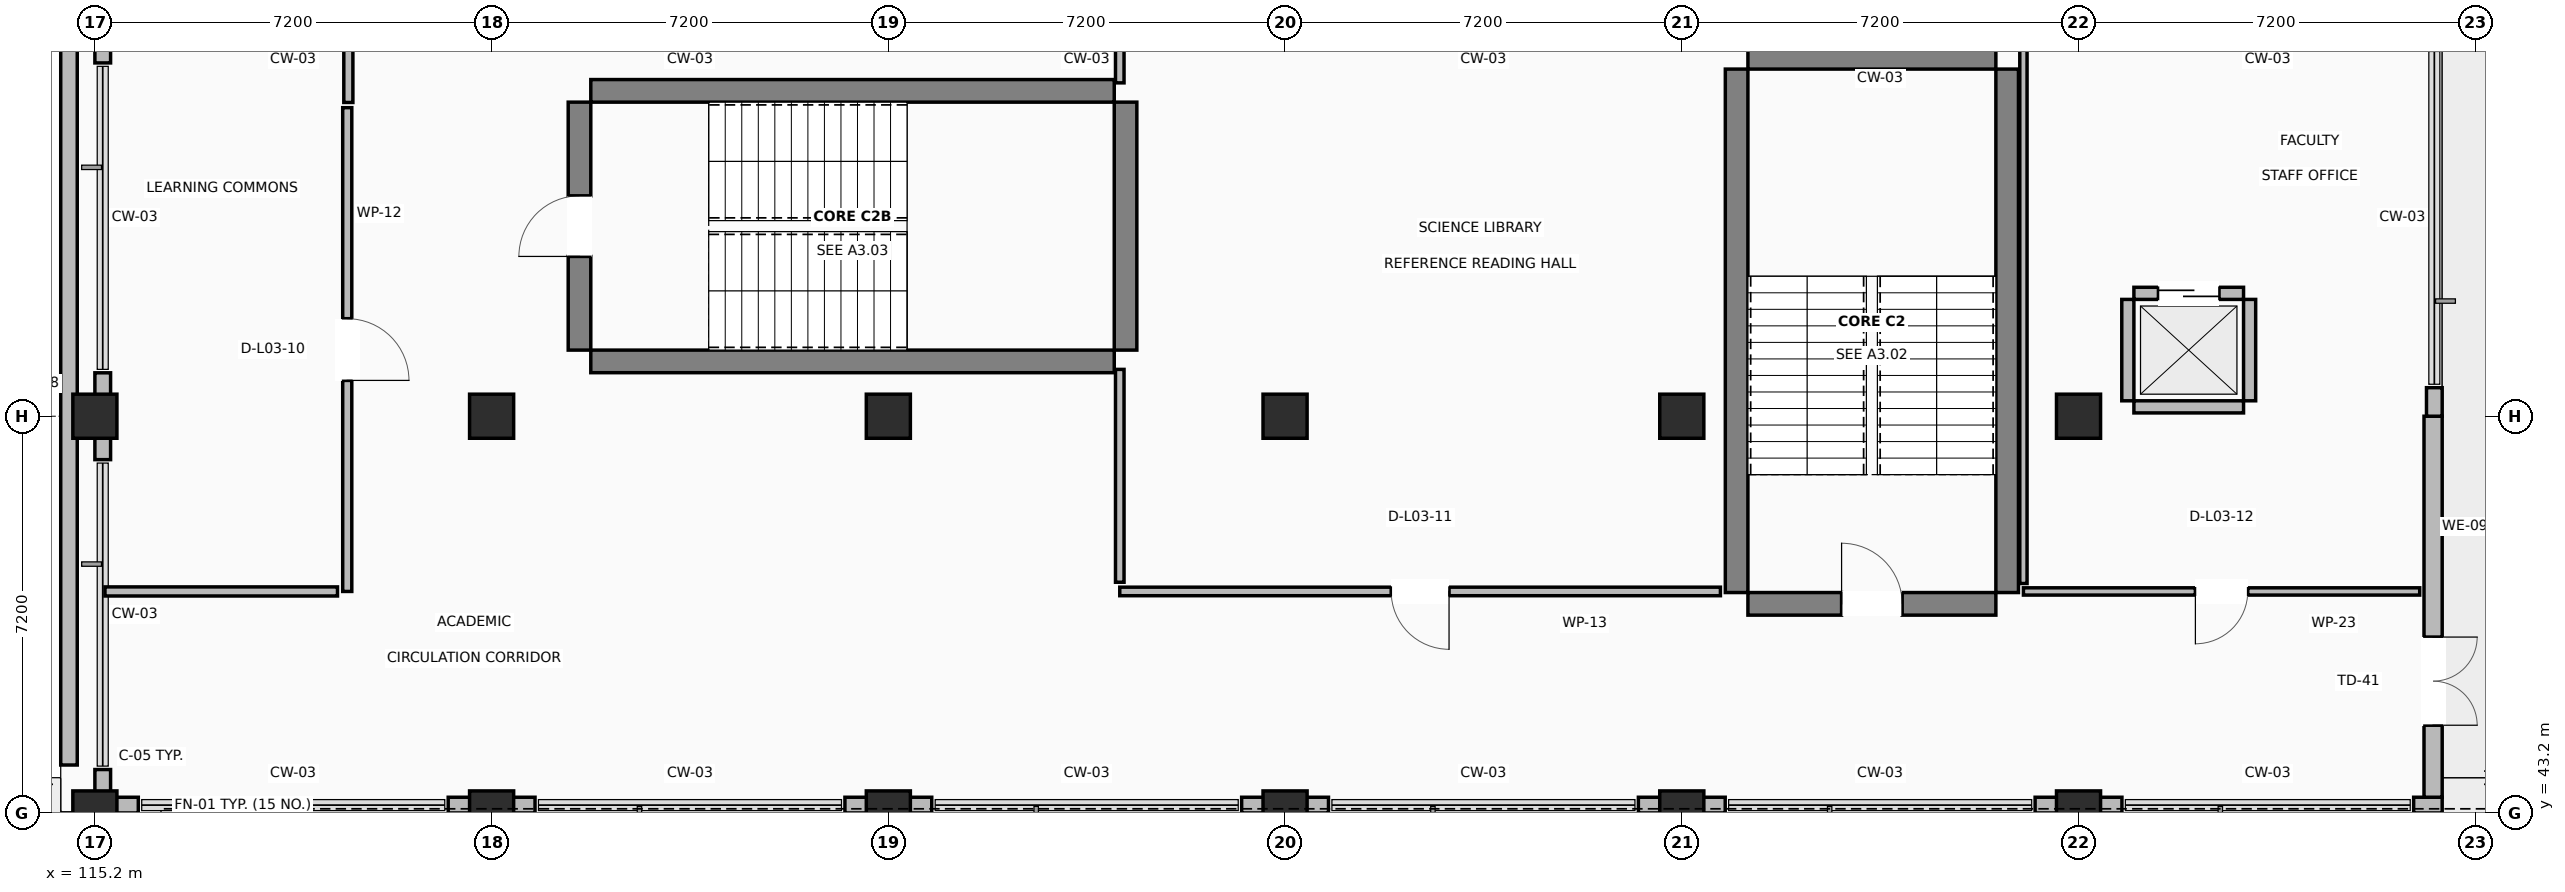
"""IFC4 building model, lengths in metres.
Left out: names, types, materials, properties, quantities, classifications, styles, units other than length and angle.
Written with IfcOpenShell. Run it as: python <this file> out.ifc"""

import sys

from ifc_helpers import new_model, si_unit, direction, frame, frame_2d, origin, origin_2d, place, context, subcontext, project, spatial, rectangle, extrude, element, fill, save


model = new_model("IFC4")
c1 = context("Model", 3, precision=1e-05, world=origin(), true_north=direction((0.0, 1.0)))
c2 = subcontext(c1, "Body", "Model", "MODEL_VIEW")
j1 = project(units=[si_unit("LENGTHUNIT", "METRE"), si_unit("PLANEANGLEUNIT", "RADIAN")], contexts=[c1])
p1 = place(None, origin())
s1 = spatial("IfcSite", under=j1, at=p1, CompositionType="ELEMENT")
p2 = place(p1, origin())
s2 = spatial("IfcBuilding", under=s1, at=p2, CompositionType="ELEMENT")
p3 = place(p2, frame((0.0, 0.0, 13.5)))
s3 = spatial("IfcBuildingStorey", under=s2, at=p3, CompositionType="ELEMENT", Elevation=13.5)
for number, where, z_axis, x_axis in (
    (1, (115.2, 43.2, 0.0), (0.0, 0.0, 1.0), (1.0, 0.0, 0.0)),
    (2, (115.2, 50.4, 0.0), (0.0, 0.0, 1.0), (1.0, 0.0, 0.0)),
    (3, (122.4, 43.2, 0.0), (0.0, 0.0, 1.0), (1.0, 0.0, 0.0)),
    (4, (122.4, 50.4, 0.0), (0.0, 0.0, 1.0), (1.0, 0.0, 0.0)),
    (5, (129.6, 43.2, 0.0), (0.0, 0.0, 1.0), (1.0, 0.0, 0.0)),
    (6, (129.6, 50.4, 0.0), (0.0, 0.0, 1.0), (1.0, 0.0, 0.0)),
    (7, (136.8, 43.2, 0.0), (0.0, 0.0, 1.0), (1.0, 0.0, 0.0)),
    (8, (136.8, 50.4, 0.0), (0.0, 0.0, 1.0), (1.0, 0.0, 0.0)),
    (9, (144.0, 43.2, 0.0), (0.0, 0.0, 1.0), (1.0, 0.0, 0.0)),
    (10, (144.0, 50.4, 0.0), (0.0, 0.0, 1.0), (1.0, 0.0, 0.0)),
    (11, (151.2, 43.2, 0.0), (0.0, 0.0, 1.0), (1.0, 0.0, 0.0)),
    (12, (151.2, 50.4, 0.0), (0.0, 0.0, 1.0), (1.0, 0.0, 0.0)),
):
    element("IfcColumn", number, at=place(p3, frame(where, z_axis=z_axis, x_axis=x_axis)), inside=s3, PredefinedType="COLUMN", context=c2, shape_type="SweptSolid", body=[
        extrude(rectangle(XDim=0.8, YDim=0.8, at=origin_2d()), origin(), (0.0, 0.0, 1.0), 4.22),
    ])
p4 = place(p3, frame((145.2, 46.995, 0.0), z_axis=(0.0, 0.0, 1.0), x_axis=(1.0, 0.0, 0.0)))
e13 = element("IfcWall", 13, at=p4, inside=s3, PredefinedType="SHEAR", context=c2, shape_type="SweptSolid", body=[
    extrude(rectangle(XDim=4.5, YDim=0.41, at=frame_2d((2.25, 0.0))), origin(), (0.0, 0.0, 1.0), 4.22),
])
p5 = place(p4, frame((1.7, 0.0, 0.0)))
e14 = element("IfcOpeningElement", 14, at=p5, cuts=e13, PredefinedType="OPENING", context=c2, shape_type="SweptSolid", body=[
    extrude(rectangle(XDim=1.1, YDim=2.15, at=frame_2d((0.55, 1.075))), frame((0.0, 0.215, 0.0), z_axis=(0.0, -1.0, 0.0), x_axis=(1.0, 0.0, 0.0)), (0.0, 0.0, 1.0), 0.43),
])
p6 = place(p3, frame((145.2, 56.905, 0.0), z_axis=(0.0, 0.0, 1.0), x_axis=(1.0, 0.0, 0.0)))
e15 = element("IfcWall", 15, at=p6, inside=s3, PredefinedType="SHEAR", context=c2, shape_type="SweptSolid", body=[
    extrude(rectangle(XDim=4.5, YDim=0.41, at=frame_2d((2.25, 0.0))), origin(), (0.0, 0.0, 1.0), 4.22),
])
for number, where, z_axis, x_axis in (
    (16, (144.995, 47.2, 0.0), (0.0, 0.0, 1.0), (0.0, 1.0, 0.0)),
    (17, (149.905, 47.2, 0.0), (0.0, 0.0, 1.0), (0.0, 1.0, 0.0)),
    (18, (124.2, 51.395, 0.0), (0.0, 0.0, 1.0), (1.0, 0.0, 0.0)),
    (19, (124.2, 56.305, 0.0), (0.0, 0.0, 1.0), (1.0, 0.0, 0.0)),
):
    element("IfcWall", number, at=place(p3, frame(where, z_axis=z_axis, x_axis=x_axis)), inside=s3, PredefinedType="SHEAR", context=c2, shape_type="SweptSolid", body=[
        extrude(rectangle(XDim=9.5, YDim=0.41, at=frame_2d((4.75, 0.0))), origin(), (0.0, 0.0, 1.0), 4.22),
    ])
p7 = place(p3, frame((123.995, 51.6, 0.0), z_axis=(0.0, 0.0, 1.0), x_axis=(0.0, 1.0, 0.0)))
e20 = element("IfcWall", 20, at=p7, inside=s3, PredefinedType="SHEAR", context=c2, shape_type="SweptSolid", body=[
    extrude(rectangle(XDim=4.5, YDim=0.41, at=frame_2d((2.25, 0.0))), origin(), (0.0, 0.0, 1.0), 4.22),
])
p8 = place(p7, frame((1.7, 0.0, 0.0)))
e21 = element("IfcOpeningElement", 21, at=p8, cuts=e20, PredefinedType="OPENING", context=c2, shape_type="SweptSolid", body=[
    extrude(rectangle(XDim=1.1, YDim=2.15, at=frame_2d((0.55, 1.075))), frame((0.0, 0.215, 0.0), z_axis=(0.0, -1.0, 0.0), x_axis=(1.0, 0.0, 0.0)), (0.0, 0.0, 1.0), 0.43),
])
p9 = place(p3, frame((133.905, 51.6, 0.0), z_axis=(0.0, 0.0, 1.0), x_axis=(0.0, 1.0, 0.0)))
e22 = element("IfcWall", 22, at=p9, inside=s3, PredefinedType="SHEAR", context=c2, shape_type="SweptSolid", body=[
    extrude(rectangle(XDim=4.5, YDim=0.41, at=frame_2d((2.25, 0.0))), origin(), (0.0, 0.0, 1.0), 4.22),
])
p10 = place(p3, frame((115.2, 43.343, 0.0), z_axis=(0.0, 0.0, 1.0), x_axis=(1.0, 0.0, 0.0)))
e23 = element("IfcWall", 23, at=p10, inside=s3, PredefinedType="STANDARD", context=c2, shape_type="SweptSolid", body=[
    extrude(rectangle(XDim=0.788, YDim=0.285, at=frame_2d((0.394, 0.0))), origin(), (0.0, 0.0, 1.0), 3.26),
])
for number, where, z_axis, x_axis in (
    (24, (121.612, 43.343, 0.0), (0.0, 0.0, 1.0), (1.0, 0.0, 0.0)),
    (25, (128.812, 43.343, 0.0), (0.0, 0.0, 1.0), (1.0, 0.0, 0.0)),
    (26, (136.012, 43.343, 0.0), (0.0, 0.0, 1.0), (1.0, 0.0, 0.0)),
):
    element("IfcWall", number, at=place(p3, frame(where, z_axis=z_axis, x_axis=x_axis)), inside=s3, PredefinedType="STANDARD", context=c2, shape_type="SweptSolid", body=[
        extrude(rectangle(XDim=1.576, YDim=0.285, at=frame_2d((0.788, 0.0))), origin(), (0.0, 0.0, 1.0), 3.26),
    ])
p11 = place(p3, frame((143.212, 43.343, 0.0), z_axis=(0.0, 0.0, 1.0), x_axis=(1.0, 0.0, 0.0)))
e27 = element("IfcWall", 27, at=p11, inside=s3, PredefinedType="STANDARD", context=c2, shape_type="SweptSolid", body=[
    extrude(rectangle(XDim=1.576, YDim=0.285, at=frame_2d((0.788, 0.0))), origin(), (0.0, 0.0, 1.0), 3.26),
])
p12 = place(p3, frame((150.412, 43.343, 0.0), z_axis=(0.0, 0.0, 1.0), x_axis=(1.0, 0.0, 0.0)))
e28 = element("IfcWall", 28, at=p12, inside=s3, PredefinedType="STANDARD", context=c2, shape_type="SweptSolid", body=[
    extrude(rectangle(XDim=1.576, YDim=0.285, at=frame_2d((0.788, 0.0))), origin(), (0.0, 0.0, 1.0), 3.26),
])
p13 = place(p3, frame((157.282, 43.343, 0.0), z_axis=(0.0, 0.0, 1.0), x_axis=(1.0, 0.0, 0.0)))
e29 = element("IfcWall", 29, at=p13, inside=s3, PredefinedType="STANDARD", context=c2, shape_type="SweptSolid", body=[
    extrude(rectangle(XDim=0.518, YDim=0.285, at=frame_2d((0.259, 0.0))), origin(), (0.0, 0.0, 1.0), 3.26),
])
p14 = place(p3, frame((157.635, 50.4, 0.0), z_axis=(0.0, 0.0, 1.0), x_axis=(0.0, -1.0, 0.0)))
e30 = element("IfcWall", 30, at=p14, inside=s3, PredefinedType="STANDARD", context=c2, shape_type="SweptSolid", body=[
    extrude(rectangle(XDim=6.915, YDim=0.33, at=frame_2d((3.458, 0.0))), origin(), (0.0, 0.0, 1.0), 3.26),
])
p15 = place(p14, frame((4.008, 0.0, 0.0)))
e31 = element("IfcOpeningElement", 31, at=p15, cuts=e30, PredefinedType="OPENING", context=c2, shape_type="SweptSolid", body=[
    extrude(rectangle(XDim=1.6, YDim=2.2, at=frame_2d((0.8, 1.1))), frame((0.0, 0.175, 0.0), z_axis=(0.0, -1.0, 0.0), x_axis=(1.0, 0.0, 0.0)), (0.0, 0.0, 1.0), 0.35),
])
p16 = place(p3, frame((157.657, 50.4, 0.0), z_axis=(0.0, 0.0, 1.0), x_axis=(0.0, 1.0, 0.0)))
e32 = element("IfcWall", 32, at=p16, inside=s3, PredefinedType="STANDARD", context=c2, shape_type="SweptSolid", body=[
    extrude(rectangle(XDim=0.518, YDim=0.285, at=frame_2d((0.259, 0.0))), origin(), (0.0, 0.0, 1.0), 3.26),
])
p17 = place(p3, frame((115.343, 57.315, 0.0), z_axis=(0.0, 0.0, 1.0), x_axis=(0.0, -1.0, 0.0)))
e33 = element("IfcWall", 33, at=p17, inside=s3, PredefinedType="STANDARD", context=c2, shape_type="SweptSolid", body=[
    extrude(rectangle(XDim=0.503, YDim=0.285, at=frame_2d((0.251, 0.0))), origin(), (0.0, 0.0, 1.0), 3.26),
])
p18 = place(p3, frame((115.343, 51.188, 0.0), z_axis=(0.0, 0.0, 1.0), x_axis=(0.0, -1.0, 0.0)))
e34 = element("IfcWall", 34, at=p18, inside=s3, PredefinedType="STANDARD", context=c2, shape_type="SweptSolid", body=[
    extrude(rectangle(XDim=1.576, YDim=0.285, at=frame_2d((0.788, 0.0))), origin(), (0.0, 0.0, 1.0), 3.26),
])
p19 = place(p3, frame((115.343, 43.988, 0.0), z_axis=(0.0, 0.0, 1.0), x_axis=(0.0, -1.0, 0.0)))
e35 = element("IfcWall", 35, at=p19, inside=s3, PredefinedType="STANDARD", context=c2, shape_type="SweptSolid", body=[
    extrude(rectangle(XDim=0.503, YDim=0.285, at=frame_2d((0.251, 0.0))), origin(), (0.0, 0.0, 1.0), 3.26),
])
p20 = place(p3, frame((114.73, 44.07, 0.0), z_axis=(0.0, 0.0, 1.0), x_axis=(0.0, 1.0, 0.0)))
e36 = element("IfcWall", 36, at=p20, inside=s3, PredefinedType="PARAPET", context=c2, shape_type="SweptSolid", body=[
    extrude(rectangle(XDim=13.85, YDim=0.3, at=frame_2d((6.925, 0.0))), origin(), (0.0, 0.0, 1.0), 1.18),
])
p21 = place(p3, frame((152.205, 50.57, 0.0), z_axis=(0.0, 0.0, 1.0), x_axis=(1.0, 0.0, 0.0)))
e37 = element("IfcWall", 37, at=p21, inside=s3, PredefinedType="STANDARD", context=c2, shape_type="SweptSolid", body=[
    extrude(rectangle(XDim=1.99, YDim=0.22, at=frame_2d((0.995, 0.0))), origin(), (0.0, 0.0, 1.0), 3.26),
])
p22 = place(p3, frame((152.205, 52.63, 0.0), z_axis=(0.0, 0.0, 1.0), x_axis=(1.0, 0.0, 0.0)))
e38 = element("IfcWall", 38, at=p22, inside=s3, PredefinedType="STANDARD", context=c2, shape_type="SweptSolid", body=[
    extrude(rectangle(XDim=1.99, YDim=0.22, at=frame_2d((0.995, 0.0))), origin(), (0.0, 0.0, 1.0), 3.26),
])
p23 = place(p22, frame((0.445, 0.0, 0.0)))
e39 = element("IfcOpeningElement", 39, at=p23, cuts=e38, PredefinedType="OPENING", context=c2, shape_type="SweptSolid", body=[
    extrude(rectangle(XDim=1.1, YDim=2.15, at=frame_2d((0.55, 1.075))), frame((0.0, 0.12, 0.0), z_axis=(0.0, -1.0, 0.0), x_axis=(1.0, 0.0, 0.0)), (0.0, 0.0, 1.0), 0.24),
])
for number, where, z_axis, x_axis in (
    (40, (152.095, 50.68, 0.0), (0.0, 0.0, 1.0), (0.0, 1.0, 0.0)),
    (41, (154.305, 50.68, 0.0), (0.0, 0.0, 1.0), (0.0, 1.0, 0.0)),
):
    element("IfcWall", number, at=place(p3, frame(where, z_axis=z_axis, x_axis=x_axis)), inside=s3, PredefinedType="STANDARD", context=c2, shape_type="SweptSolid", body=[
        extrude(rectangle(XDim=1.84, YDim=0.22, at=frame_2d((0.92, 0.0))), origin(), (0.0, 0.0, 1.0), 3.26),
    ])
p24 = place(p3, frame((119.78, 56.0, 0.0), z_axis=(0.0, 0.0, 1.0), x_axis=(0.0, -1.0, 0.0)))
e42 = element("IfcWall", 42, at=p24, inside=s3, PredefinedType="PARTITIONING", context=c2, shape_type="SweptSolid", body=[
    extrude(rectangle(XDim=8.78, YDim=0.165, at=frame_2d((4.39, 0.0))), origin(), (0.0, 0.0, 1.0), 3.26),
])
p25 = place(p24, frame((3.83, 0.0, 0.0)))
e43 = element("IfcOpeningElement", 43, at=p25, cuts=e42, PredefinedType="OPENING", context=c2, shape_type="SweptSolid", body=[
    extrude(rectangle(XDim=1.12, YDim=2.15, at=frame_2d((0.56, 1.075))), frame((0.0, 0.093, 0.0), z_axis=(0.0, -1.0, 0.0), x_axis=(1.0, 0.0, 0.0)), (0.0, 0.0, 1.0), 0.185),
])
p26 = place(p3, frame((119.603, 47.22, 0.0), z_axis=(0.0, 0.0, 1.0), x_axis=(-1.0, 0.0, 0.0)))
e44 = element("IfcWall", 44, at=p26, inside=s3, PredefinedType="PARTITIONING", context=c2, shape_type="SweptSolid", body=[
    extrude(rectangle(XDim=4.22, YDim=0.165, at=frame_2d((2.11, 0.0))), origin(), (0.0, 0.0, 1.0), 3.26),
])
p27 = place(p3, frame((119.8, 57.418, 0.0), z_axis=(0.0, 0.0, 1.0), x_axis=(0.0, -1.0, 0.0)))
e45 = element("IfcWall", 45, at=p27, inside=s3, PredefinedType="PARTITIONING", context=c2, shape_type="SweptSolid", body=[
    extrude(rectangle(XDim=1.324, YDim=0.165, at=frame_2d((0.662, 0.0))), origin(), (0.0, 0.0, 1.0), 3.26),
])
p28 = place(p3, frame((144.701, 47.22, 0.0), z_axis=(0.0, 0.0, 1.0), x_axis=(-1.0, 0.0, 0.0)))
e46 = element("IfcWall", 46, at=p28, inside=s3, PredefinedType="PARTITIONING", context=c2, shape_type="SweptSolid", body=[
    extrude(rectangle(XDim=10.901, YDim=0.155, at=frame_2d((5.45, 0.0))), origin(), (0.0, 0.0, 1.0), 3.26),
])
p29 = place(p28, frame((4.925, 0.0, 0.0)))
e47 = element("IfcOpeningElement", 47, at=p29, cuts=e46, PredefinedType="OPENING", context=c2, shape_type="SweptSolid", body=[
    extrude(rectangle(XDim=1.05, YDim=2.15, at=frame_2d((0.525, 1.075))), frame((0.0, 0.087, 0.0), z_axis=(0.0, -1.0, 0.0), x_axis=(1.0, 0.0, 0.0)), (0.0, 0.0, 1.0), 0.175),
])
p30 = place(p3, frame((133.8, 47.387, 0.0), z_axis=(0.0, 0.0, 1.0), x_axis=(0.0, 1.0, 0.0)))
e48 = element("IfcWall", 48, at=p30, inside=s3, PredefinedType="PARTITIONING", context=c2, shape_type="SweptSolid", body=[
    extrude(rectangle(XDim=3.863, YDim=0.155, at=frame_2d((1.932, 0.0))), origin(), (0.0, 0.0, 1.0), 3.26),
])
p31 = place(p3, frame((133.8, 56.45, 0.0), z_axis=(0.0, 0.0, 1.0), x_axis=(0.0, 1.0, 0.0)))
e49 = element("IfcWall", 49, at=p31, inside=s3, PredefinedType="PARTITIONING", context=c2, shape_type="SweptSolid", body=[
    extrude(rectangle(XDim=0.968, YDim=0.155, at=frame_2d((0.484, 0.0))), origin(), (0.0, 0.0, 1.0), 3.26),
])
p32 = place(p3, frame((157.392, 47.22, 0.0), z_axis=(0.0, 0.0, 1.0), x_axis=(-1.0, 0.0, 0.0)))
e50 = element("IfcWall", 50, at=p32, inside=s3, PredefinedType="PARTITIONING", context=c2, shape_type="SweptSolid", body=[
    extrude(rectangle(XDim=7.192, YDim=0.132, at=frame_2d((3.596, 0.0))), origin(), (0.0, 0.0, 1.0), 3.26),
])
p33 = place(p32, frame((3.121, 0.0, 0.0)))
e51 = element("IfcOpeningElement", 51, at=p33, cuts=e50, PredefinedType="OPENING", context=c2, shape_type="SweptSolid", body=[
    extrude(rectangle(XDim=0.95, YDim=2.1, at=frame_2d((0.475, 1.05))), frame((0.0, 0.076, 0.0), z_axis=(0.0, -1.0, 0.0), x_axis=(1.0, 0.0, 0.0)), (0.0, 0.0, 1.0), 0.152),
])
p34 = place(p3, frame((150.2, 47.364, 0.0), z_axis=(0.0, 0.0, 1.0), x_axis=(0.0, 1.0, 0.0)))
e52 = element("IfcWall", 52, at=p34, inside=s3, PredefinedType="PARTITIONING", context=c2, shape_type="SweptSolid", body=[
    extrude(rectangle(XDim=10.054, YDim=0.132, at=frame_2d((5.027, 0.0))), origin(), (0.0, 0.0, 1.0), 3.26),
])
p35 = place(p15, origin())
e53 = element("IfcDoor", 53, at=p35, inside=s3, OperationType="DOUBLE_DOOR_SINGLE_SWING", PredefinedType="DOOR", context=c2, shape_type="SweptSolid", body=[
    extrude(rectangle(XDim=1.6, YDim=2.2, at=frame_2d((0.8, 1.1))), frame((0.0, 0.025, 0.0), z_axis=(0.0, -1.0, 0.0), x_axis=(1.0, 0.0, 0.0)), (0.0, 0.0, 1.0), 0.05),
])
fill(e31, e53)
p36 = place(p5, origin())
e54 = element("IfcDoor", 54, at=p36, inside=s3, OperationType="SINGLE_SWING_LEFT", PredefinedType="DOOR", context=c2, shape_type="SweptSolid", body=[
    extrude(rectangle(XDim=1.1, YDim=2.15, at=frame_2d((0.55, 1.075))), frame((0.0, 0.025, 0.0), z_axis=(0.0, -1.0, 0.0), x_axis=(1.0, 0.0, 0.0)), (0.0, 0.0, 1.0), 0.05),
])
fill(e14, e54)
p37 = place(p8, origin())
e55 = element("IfcDoor", 55, at=p37, inside=s3, OperationType="SINGLE_SWING_LEFT", PredefinedType="DOOR", context=c2, shape_type="SweptSolid", body=[
    extrude(rectangle(XDim=1.1, YDim=2.15, at=frame_2d((0.55, 1.075))), frame((0.0, 0.025, 0.0), z_axis=(0.0, -1.0, 0.0), x_axis=(1.0, 0.0, 0.0)), (0.0, 0.0, 1.0), 0.05),
])
fill(e21, e55)
p38 = place(p23, origin())
e56 = element("IfcDoor", 56, at=p38, inside=s3, OperationType="SLIDING_TO_LEFT", PredefinedType="DOOR", context=c2, shape_type="SweptSolid", body=[
    extrude(rectangle(XDim=1.1, YDim=2.15, at=frame_2d((0.55, 1.075))), frame((0.0, 0.025, 0.0), z_axis=(0.0, -1.0, 0.0), x_axis=(1.0, 0.0, 0.0)), (0.0, 0.0, 1.0), 0.05),
])
fill(e39, e56)
p39 = place(p25, origin())
e57 = element("IfcDoor", 57, at=p39, inside=s3, OperationType="SINGLE_SWING_RIGHT", PredefinedType="DOOR", context=c2, shape_type="SweptSolid", body=[
    extrude(rectangle(XDim=1.12, YDim=2.15, at=frame_2d((0.56, 1.075))), frame((0.0, 0.025, 0.0), z_axis=(0.0, -1.0, 0.0), x_axis=(1.0, 0.0, 0.0)), (0.0, 0.0, 1.0), 0.05),
])
fill(e43, e57)
p40 = place(p29, origin())
e58 = element("IfcDoor", 58, at=p40, inside=s3, OperationType="SINGLE_SWING_LEFT", PredefinedType="DOOR", context=c2, shape_type="SweptSolid", body=[
    extrude(rectangle(XDim=1.05, YDim=2.15, at=frame_2d((0.525, 1.075))), frame((0.0, 0.025, 0.0), z_axis=(0.0, -1.0, 0.0), x_axis=(1.0, 0.0, 0.0)), (0.0, 0.0, 1.0), 0.05),
])
fill(e47, e58)
p41 = place(p33, origin())
e59 = element("IfcDoor", 59, at=p41, inside=s3, OperationType="SINGLE_SWING_RIGHT", PredefinedType="DOOR", context=c2, shape_type="SweptSolid", body=[
    extrude(rectangle(XDim=0.95, YDim=2.1, at=frame_2d((0.475, 1.05))), frame((0.0, 0.025, 0.0), z_axis=(0.0, -1.0, 0.0), x_axis=(1.0, 0.0, 0.0)), (0.0, 0.0, 1.0), 0.05),
])
fill(e51, e59)
save(model, sys.argv[1])
